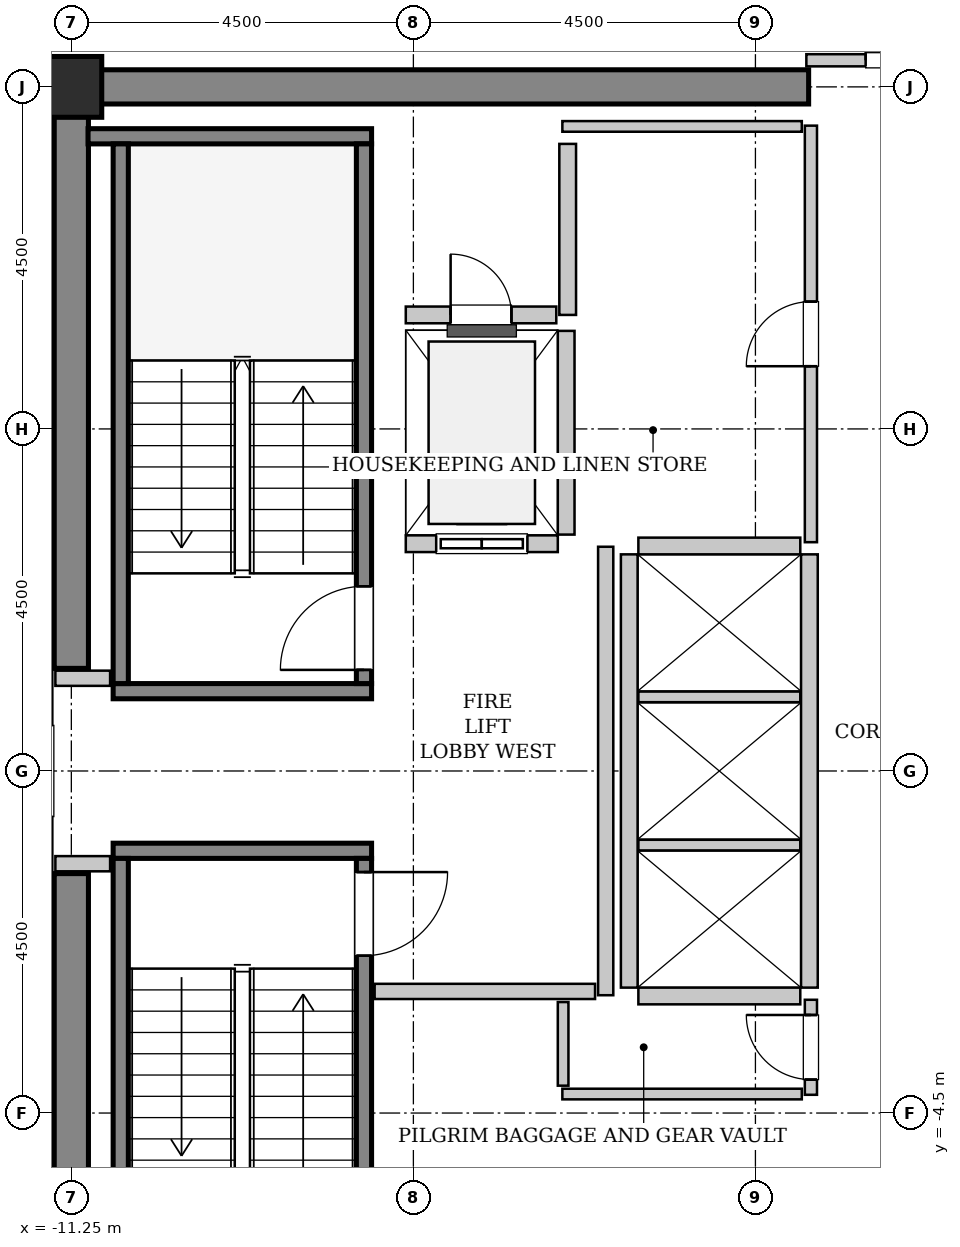
"""IFC4 building model, lengths in metres.
Left out: names, types, materials, properties, quantities, classifications, styles, units other than length and angle.
Written with IfcOpenShell. Run it as: python <this file> out.ifc"""

import sys

from ifc_helpers import new_model, si_unit, direction, frame, frame_2d, origin, origin_2d, place, context, subcontext, project, spatial, rectangle, hollow_rectangle, extrude, source, transform, mapped, element, fill, save


model = new_model("IFC4")
c1 = context("Model", 3, precision=1e-05, world=origin(), true_north=direction((0.0, 1.0)))
c2 = subcontext(c1, "Body", "Model", "MODEL_VIEW")
j1 = project(units=[si_unit("LENGTHUNIT", "METRE"), si_unit("PLANEANGLEUNIT", "RADIAN")], contexts=[c1])
p1 = place(None, origin())
s1 = spatial("IfcSite", under=j1, at=p1, CompositionType="ELEMENT")
p2 = place(p1, origin())
s2 = spatial("IfcBuilding", under=s1, at=p2, CompositionType="ELEMENT")
p3 = place(p2, frame((0.0, 0.0, 214.2)))
s3 = spatial("IfcBuildingStorey", under=s2, at=p3, CompositionType="ELEMENT", Elevation=214.2)
m1 = source(origin(), c2, "Body", "SweptSolid", [
    extrude(rectangle(XDim=9.925, YDim=0.45, at=frame_2d((4.962, 0.0))), origin(), (0.0, 0.0, 1.0), 3.8),
])
p4 = place(p3, frame((-11.475, 9.0, 0.0), z_axis=(0.0, 0.0, 1.0), x_axis=(1.0, 0.0, 0.0)))
e1 = element("IfcWall", 1, at=p4, inside=s3, PredefinedType="SHEAR", context=c2, shape_type="MappedRepresentation", body=[
    mapped(m1, transform((0.0, 0.0, 0.0), x_axis=(1.0, 0.0, 0.0), y_axis=(0.0, 1.0, 0.0), z_axis=(0.0, 0.0, 1.0), scale=1.0)),
])
m2 = source(origin(), c2, "Body", "SweptSolid", [
    extrude(rectangle(XDim=7.425, YDim=0.45, at=frame_2d((3.712, 0.0))), origin(), (0.0, 0.0, 1.0), 3.8),
])
for number, where, z_axis, x_axis in (
    (2, (-11.25, -8.775, 0.0), (0.0, 0.0, 1.0), (0.0, 1.0, 0.0)),
    (3, (-11.25, 1.35, 0.0), (0.0, 0.0, 1.0), (0.0, 1.0, 0.0)),
):
    element("IfcWall", number, at=place(p3, frame(where, z_axis=z_axis, x_axis=x_axis)), inside=s3, PredefinedType="SHEAR", context=c2, shape_type="MappedRepresentation", body=[
        mapped(m2, transform((0.0, 0.0, 0.0), x_axis=(1.0, 0.0, 0.0), y_axis=(0.0, 1.0, 0.0), z_axis=(0.0, 0.0, 1.0), scale=1.0)),
    ])
m3 = source(origin(), c2, "Body", "SweptSolid", [
    extrude(hollow_rectangle(XDim=0.8, YDim=0.8, WallThickness=0.04, InnerFilletRadius=0.04, OuterFilletRadius=0.08, at=origin_2d()), origin(), (0.0, 0.0, 1.0), 3.8),
])
p5 = place(p3, frame((-11.25, 9.0, 0.0), z_axis=(0.0, 0.0, 1.0), x_axis=(1.0, 0.0, 0.0)))
e4 = element("IfcColumn", 4, at=p5, inside=s3, PredefinedType="COLUMN", context=c2, shape_type="MappedRepresentation", body=[
    mapped(m3, transform((0.0, 0.0, 0.0), x_axis=(1.0, 0.0, 0.0), y_axis=(0.0, 1.0, 0.0), z_axis=(0.0, 0.0, 1.0), scale=1.0)),
])
m4 = source(origin(), c2, "Body", "SweptSolid", [
    extrude(rectangle(XDim=3.4, YDim=0.2, at=frame_2d((1.7, 0.0))), origin(), (0.0, 0.0, 1.0), 3.8),
])
p6 = place(p3, frame((-7.3, 1.05, 0.0), z_axis=(0.0, 0.0, 1.0), x_axis=(-1.0, 0.0, 0.0)))
e5 = element("IfcWall", 5, at=p6, inside=s3, PredefinedType="SOLIDWALL", context=c2, shape_type="MappedRepresentation", body=[
    mapped(m4, transform((0.0, 0.0, 0.0), x_axis=(1.0, 0.0, 0.0), y_axis=(0.0, 1.0, 0.0), z_axis=(0.0, 0.0, 1.0), scale=1.0)),
])
m5 = source(origin(), c2, "Body", "SweptSolid", [
    extrude(rectangle(XDim=3.73, YDim=0.2, at=frame_2d((1.865, 0.0))), origin(), (0.0, 0.0, 1.0), 3.8),
])
p7 = place(p3, frame((-7.3, 8.35, 0.0), z_axis=(0.0, 0.0, 1.0), x_axis=(-1.0, 0.0, 0.0)))
e6 = element("IfcWall", 6, at=p7, inside=s3, PredefinedType="SOLIDWALL", context=c2, shape_type="MappedRepresentation", body=[
    mapped(m5, transform((0.0, 0.0, 0.0), x_axis=(1.0, 0.0, 0.0), y_axis=(0.0, 1.0, 0.0), z_axis=(0.0, 0.0, 1.0), scale=1.0)),
])
m6 = source(origin(), c2, "Body", "SweptSolid", [
    extrude(rectangle(XDim=7.1, YDim=0.2, at=frame_2d((3.55, 0.0))), origin(), (0.0, 0.0, 1.0), 3.8),
])
p8 = place(p3, frame((-7.4, 1.15, 0.0), z_axis=(0.0, 0.0, 1.0), x_axis=(0.0, 1.0, 0.0)))
e7 = element("IfcWall", 7, at=p8, inside=s3, PredefinedType="SOLIDWALL", context=c2, shape_type="MappedRepresentation", body=[
    mapped(m6, transform((0.0, 0.0, 0.0), x_axis=(1.0, 0.0, 0.0), y_axis=(0.0, 1.0, 0.0), z_axis=(0.0, 0.0, 1.0), scale=1.0)),
])
p9 = place(p8, frame((0.18, 0.0, 0.0)))
e8 = element("IfcOpeningElement", 8, at=p9, cuts=e7, PredefinedType="OPENING", context=c2, shape_type="SweptSolid", body=[
    extrude(rectangle(XDim=1.1, YDim=2.15, at=frame_2d((0.55, 1.075))), frame((0.0, 0.11, 0.0), z_axis=(0.0, -1.0, 0.0), x_axis=(1.0, 0.0, 0.0)), (0.0, 0.0, 1.0), 0.22),
])
p10 = place(p3, frame((-10.6, 1.15, 0.0), z_axis=(0.0, 0.0, 1.0), x_axis=(0.0, 1.0, 0.0)))
e9 = element("IfcWall", 9, at=p10, inside=s3, PredefinedType="SOLIDWALL", context=c2, shape_type="MappedRepresentation", body=[
    mapped(m6, transform((0.0, 0.0, 0.0), x_axis=(1.0, 0.0, 0.0), y_axis=(0.0, 1.0, 0.0), z_axis=(0.0, 0.0, 1.0), scale=1.0)),
])
p11 = place(p3, frame((-10.7, -1.05, 0.0), z_axis=(0.0, 0.0, 1.0), x_axis=(1.0, 0.0, 0.0)))
e10 = element("IfcWall", 10, at=p11, inside=s3, PredefinedType="SOLIDWALL", context=c2, shape_type="MappedRepresentation", body=[
    mapped(m4, transform((0.0, 0.0, 0.0), x_axis=(1.0, 0.0, 0.0), y_axis=(0.0, 1.0, 0.0), z_axis=(0.0, 0.0, 1.0), scale=1.0)),
])
p12 = place(p3, frame((-10.6, -1.15, 0.0), z_axis=(0.0, 0.0, 1.0), x_axis=(0.0, -1.0, 0.0)))
e11 = element("IfcWall", 11, at=p12, inside=s3, PredefinedType="SOLIDWALL", context=c2, shape_type="MappedRepresentation", body=[
    mapped(m6, transform((0.0, 0.0, 0.0), x_axis=(1.0, 0.0, 0.0), y_axis=(0.0, 1.0, 0.0), z_axis=(0.0, 0.0, 1.0), scale=1.0)),
])
p13 = place(p3, frame((-7.4, -1.15, 0.0), z_axis=(0.0, 0.0, 1.0), x_axis=(0.0, -1.0, 0.0)))
e12 = element("IfcWall", 12, at=p13, inside=s3, PredefinedType="SOLIDWALL", context=c2, shape_type="MappedRepresentation", body=[
    mapped(m6, transform((0.0, 0.0, 0.0), x_axis=(1.0, 0.0, 0.0), y_axis=(0.0, 1.0, 0.0), z_axis=(0.0, 0.0, 1.0), scale=1.0)),
])
p14 = place(p13, frame((0.18, 0.0, 0.0)))
e13 = element("IfcOpeningElement", 13, at=p14, cuts=e12, PredefinedType="OPENING", context=c2, shape_type="SweptSolid", body=[
    extrude(rectangle(XDim=1.1, YDim=2.15, at=frame_2d((0.55, 1.075))), frame((0.0, 0.11, 0.0), z_axis=(0.0, -1.0, 0.0), x_axis=(1.0, 0.0, 0.0)), (0.0, 0.0, 1.0), 0.22),
])
m7 = source(origin(), c2, "Body", "SweptSolid", [
    extrude(rectangle(XDim=2.0, YDim=0.22, at=frame_2d((1.0, 0.0))), origin(), (0.0, 0.0, 1.0), 3.535),
])
p15 = place(p3, frame((-6.85, 2.99, 0.0), z_axis=(0.0, 0.0, 1.0), x_axis=(1.0, 0.0, 0.0)))
e14 = element("IfcWall", 14, at=p15, inside=s3, PredefinedType="SOLIDWALL", context=c2, shape_type="MappedRepresentation", body=[
    mapped(m7, transform((0.0, 0.0, 0.0), x_axis=(1.0, 0.0, 0.0), y_axis=(0.0, 1.0, 0.0), z_axis=(0.0, 0.0, 1.0), scale=1.0)),
])
p16 = place(p15, frame((0.4, 0.0, 0.0)))
e15 = element("IfcOpeningElement", 15, at=p16, cuts=e14, PredefinedType="OPENING", context=c2, shape_type="SweptSolid", body=[
    extrude(rectangle(XDim=1.2, YDim=2.2, at=frame_2d((0.6, 1.1))), frame((0.0, 0.12, 0.0), z_axis=(0.0, -1.0, 0.0), x_axis=(1.0, 0.0, 0.0)), (0.0, 0.0, 1.0), 0.24),
])
m8 = source(origin(), c2, "Body", "SweptSolid", [
    extrude(rectangle(XDim=2.68, YDim=0.22, at=frame_2d((1.34, 0.0))), origin(), (0.0, 0.0, 1.0), 3.535),
])
p17 = place(p3, frame((-4.74, 3.11, 0.0), z_axis=(0.0, 0.0, 1.0), x_axis=(0.0, 1.0, 0.0)))
e16 = element("IfcWall", 16, at=p17, inside=s3, PredefinedType="SOLIDWALL", context=c2, shape_type="MappedRepresentation", body=[
    mapped(m8, transform((0.0, 0.0, 0.0), x_axis=(1.0, 0.0, 0.0), y_axis=(0.0, 1.0, 0.0), z_axis=(0.0, 0.0, 1.0), scale=1.0)),
])
m9 = source(origin(), c2, "Body", "SweptSolid", [
    extrude(rectangle(XDim=5.7, YDim=0.22, at=frame_2d((2.85, 0.0))), origin(), (0.0, 0.0, 1.0), 3.535),
])
for number, where, z_axis, x_axis in (
    (17, (-1.54, -2.85, 0.0), (0.0, 0.0, 1.0), (0.0, 1.0, 0.0)),
    (18, (-3.91, 2.85, 0.0), (0.0, 0.0, 1.0), (0.0, -1.0, 0.0)),
):
    element("IfcWall", number, at=place(p3, frame(where, z_axis=z_axis, x_axis=x_axis)), inside=s3, PredefinedType="SOLIDWALL", context=c2, shape_type="MappedRepresentation", body=[
        mapped(m9, transform((0.0, 0.0, 0.0), x_axis=(1.0, 0.0, 0.0), y_axis=(0.0, 1.0, 0.0), z_axis=(0.0, 0.0, 1.0), scale=1.0)),
    ])
m10 = source(origin(), c2, "Body", "SweptSolid", [
    extrude(rectangle(XDim=2.13, YDim=0.22, at=frame_2d((1.065, 0.0))), origin(), (0.0, 0.0, 1.0), 3.535),
])
p18 = place(p3, frame((-3.79, -2.96, 0.0), z_axis=(0.0, 0.0, 1.0), x_axis=(1.0, 0.0, 0.0)))
e19 = element("IfcWall", 19, at=p18, inside=s3, PredefinedType="SOLIDWALL", context=c2, shape_type="MappedRepresentation", body=[
    mapped(m10, transform((0.0, 0.0, 0.0), x_axis=(1.0, 0.0, 0.0), y_axis=(0.0, 1.0, 0.0), z_axis=(0.0, 0.0, 1.0), scale=1.0)),
])
m11 = source(origin(), c2, "Body", "SweptSolid", [
    extrude(rectangle(XDim=2.13, YDim=0.14, at=frame_2d((1.065, 0.0))), origin(), (0.0, 0.0, 1.0), 3.535),
])
for number, where, z_axis, x_axis in (
    (20, (-3.79, -0.975, 0.0), (0.0, 0.0, 1.0), (1.0, 0.0, 0.0)),
    (21, (-3.79, 0.975, 0.0), (0.0, 0.0, 1.0), (1.0, 0.0, 0.0)),
):
    element("IfcWall", number, at=place(p3, frame(where, z_axis=z_axis, x_axis=x_axis)), inside=s3, PredefinedType="PARTITIONING", context=c2, shape_type="MappedRepresentation", body=[
        mapped(m11, transform((0.0, 0.0, 0.0), x_axis=(1.0, 0.0, 0.0), y_axis=(0.0, 1.0, 0.0), z_axis=(0.0, 0.0, 1.0), scale=1.0)),
    ])
p19 = place(p3, frame((-1.66, 2.96, 0.0), z_axis=(0.0, 0.0, 1.0), x_axis=(-1.0, 0.0, 0.0)))
e22 = element("IfcWall", 22, at=p19, inside=s3, PredefinedType="SOLIDWALL", context=c2, shape_type="MappedRepresentation", body=[
    mapped(m10, transform((0.0, 0.0, 0.0), x_axis=(1.0, 0.0, 0.0), y_axis=(0.0, 1.0, 0.0), z_axis=(0.0, 0.0, 1.0), scale=1.0)),
])
m12 = source(origin(), c2, "Body", "SweptSolid", [
    extrude(rectangle(XDim=2.25, YDim=0.22, at=frame_2d((1.125, 0.0))), origin(), (0.0, 0.0, 1.0), 3.535),
])
p20 = place(p3, frame((-4.72, 6.0, 0.0), z_axis=(0.0, 0.0, 1.0), x_axis=(0.0, 1.0, 0.0)))
e23 = element("IfcWall", 23, at=p20, inside=s3, PredefinedType="SOLIDWALL", context=c2, shape_type="MappedRepresentation", body=[
    mapped(m12, transform((0.0, 0.0, 0.0), x_axis=(1.0, 0.0, 0.0), y_axis=(0.0, 1.0, 0.0), z_axis=(0.0, 0.0, 1.0), scale=1.0)),
])
m13 = source(origin(), c2, "Body", "SweptSolid", [
    extrude(rectangle(XDim=1.98, YDim=0.22, at=frame_2d((0.99, 0.0))), origin(), (0.0, 0.0, 1.0), 3.535),
])
p21 = place(p3, frame((-6.85, 6.0, 0.0), z_axis=(0.0, 0.0, 1.0), x_axis=(1.0, 0.0, 0.0)))
e24 = element("IfcWall", 24, at=p21, inside=s3, PredefinedType="SOLIDWALL", context=c2, shape_type="MappedRepresentation", body=[
    mapped(m13, transform((0.0, 0.0, 0.0), x_axis=(1.0, 0.0, 0.0), y_axis=(0.0, 1.0, 0.0), z_axis=(0.0, 0.0, 1.0), scale=1.0)),
])
p22 = place(p21, frame((0.59, 0.0, 0.0)))
e25 = element("IfcOpeningElement", 25, at=p22, cuts=e24, PredefinedType="OPENING", context=c2, shape_type="SweptSolid", body=[
    extrude(rectangle(XDim=0.8, YDim=2.0, at=frame_2d((0.4, 1.0))), frame((0.0, 0.12, 0.0), z_axis=(0.0, -1.0, 0.0), x_axis=(1.0, 0.0, 0.0)), (0.0, 0.0, 1.0), 0.24),
])
m14 = source(origin(), c2, "Body", "SweptSolid", [
    extrude(rectangle(XDim=5.9, YDim=0.2, at=frame_2d((2.95, 0.0))), origin(), (0.0, 0.0, 1.0), 3.535),
])
p23 = place(p3, frame((-4.22, -2.95, 0.0), z_axis=(0.0, 0.0, 1.0), x_axis=(0.0, 1.0, 0.0)))
e26 = element("IfcWall", 26, at=p23, inside=s3, PredefinedType="PARTITIONING", context=c2, shape_type="MappedRepresentation", body=[
    mapped(m14, transform((0.0, 0.0, 0.0), x_axis=(1.0, 0.0, 0.0), y_axis=(0.0, 1.0, 0.0), z_axis=(0.0, 0.0, 1.0), scale=1.0)),
])
m15 = source(origin(), c2, "Body", "SweptSolid", [
    extrude(rectangle(XDim=2.9, YDim=0.2, at=frame_2d((1.45, 0.0))), origin(), (0.0, 0.0, 1.0), 3.535),
])
p24 = place(p3, frame((-7.26, -2.9, 0.0), z_axis=(0.0, 0.0, 1.0), x_axis=(1.0, 0.0, 0.0)))
e27 = element("IfcWall", 27, at=p24, inside=s3, PredefinedType="PARTITIONING", context=c2, shape_type="MappedRepresentation", body=[
    mapped(m15, transform((0.0, 0.0, 0.0), x_axis=(1.0, 0.0, 0.0), y_axis=(0.0, 1.0, 0.0), z_axis=(0.0, 0.0, 1.0), scale=1.0)),
])
m16 = source(origin(), c2, "Body", "SweptSolid", [
    extrude(rectangle(XDim=0.72, YDim=0.2, at=frame_2d((0.36, 0.0))), origin(), (0.0, 0.0, 1.0), 3.535),
])
for number, where, z_axis, x_axis in (
    (28, (-11.46, 1.22, 0.0), (0.0, 0.0, 1.0), (1.0, 0.0, 0.0)),
    (29, (-11.46, -1.22, 0.0), (0.0, 0.0, 1.0), (1.0, 0.0, 0.0)),
):
    element("IfcWall", number, at=place(p3, frame(where, z_axis=z_axis, x_axis=x_axis)), inside=s3, PredefinedType="PARTITIONING", context=c2, shape_type="MappedRepresentation", body=[
        mapped(m16, transform((0.0, 0.0, 0.0), x_axis=(1.0, 0.0, 0.0), y_axis=(0.0, 1.0, 0.0), z_axis=(0.0, 0.0, 1.0), scale=1.0)),
    ])
m17 = source(origin(), c2, "Body", "SweptSolid", [
    extrude(rectangle(XDim=3.16, YDim=0.16, at=frame_2d((1.58, 0.0))), origin(), (0.0, 0.0, 1.0), 2.625),
])
p25 = place(p3, frame((-1.58, 9.35, 0.0), z_axis=(0.0, 0.0, 1.0), x_axis=(1.0, 0.0, 0.0)))
e30 = element("IfcWall", 30, at=p25, inside=s3, PredefinedType="PARTITIONING", context=c2, shape_type="MappedRepresentation", body=[
    mapped(m17, transform((0.0, 0.0, 0.0), x_axis=(1.0, 0.0, 0.0), y_axis=(0.0, 1.0, 0.0), z_axis=(0.0, 0.0, 1.0), scale=1.0)),
])
p26 = place(p25, frame((0.78, 0.0, 0.0)))
e31 = element("IfcOpeningElement", 31, at=p26, cuts=e30, PredefinedType="OPENING", context=c2, shape_type="SweptSolid", body=[
    extrude(rectangle(XDim=1.6, YDim=2.3, at=frame_2d((0.8, 1.15))), frame((0.0, 0.09, 0.0), z_axis=(0.0, -1.0, 0.0), x_axis=(1.0, 0.0, 0.0)), (0.0, 0.0, 1.0), 0.18),
])
m18 = source(origin(), c2, "Body", "SweptSolid", [
    extrude(rectangle(XDim=5.48, YDim=0.16, at=frame_2d((2.74, 0.0))), origin(), (0.0, 0.0, 1.0), 3.535),
])
p27 = place(p3, frame((-1.52, 3.01, 0.0), z_axis=(0.0, 0.0, 1.0), x_axis=(0.0, 1.0, 0.0)))
e32 = element("IfcWall", 32, at=p27, inside=s3, PredefinedType="PARTITIONING", context=c2, shape_type="MappedRepresentation", body=[
    mapped(m18, transform((0.0, 0.0, 0.0), x_axis=(1.0, 0.0, 0.0), y_axis=(0.0, 1.0, 0.0), z_axis=(0.0, 0.0, 1.0), scale=1.0)),
])
p28 = place(p27, frame((2.315, 0.0, 0.0)))
e33 = element("IfcOpeningElement", 33, at=p28, cuts=e32, PredefinedType="OPENING", context=c2, shape_type="SweptSolid", body=[
    extrude(rectangle(XDim=0.85, YDim=2.1, at=frame_2d((0.425, 1.05))), frame((0.0, 0.09, 0.0), z_axis=(0.0, -1.0, 0.0), x_axis=(1.0, 0.0, 0.0)), (0.0, 0.0, 1.0), 0.18),
])
m19 = source(origin(), c2, "Body", "SweptSolid", [
    extrude(rectangle(XDim=3.15, YDim=0.14, at=frame_2d((1.575, 0.0))), origin(), (0.0, 0.0, 1.0), 3.535),
])
p29 = place(p3, frame((-4.79, 8.48, 0.0), z_axis=(0.0, 0.0, 1.0), x_axis=(1.0, 0.0, 0.0)))
e34 = element("IfcWall", 34, at=p29, inside=s3, PredefinedType="PARTITIONING", context=c2, shape_type="MappedRepresentation", body=[
    mapped(m19, transform((0.0, 0.0, 0.0), x_axis=(1.0, 0.0, 0.0), y_axis=(0.0, 1.0, 0.0), z_axis=(0.0, 0.0, 1.0), scale=1.0)),
])
m20 = source(origin(), c2, "Body", "SweptSolid", [
    extrude(rectangle(XDim=1.25, YDim=0.16, at=frame_2d((0.625, 0.0))), origin(), (0.0, 0.0, 1.0), 3.535),
])
p30 = place(p3, frame((-1.52, -4.26, 0.0), z_axis=(0.0, 0.0, 1.0), x_axis=(0.0, 1.0, 0.0)))
e35 = element("IfcWall", 35, at=p30, inside=s3, PredefinedType="PARTITIONING", context=c2, shape_type="MappedRepresentation", body=[
    mapped(m20, transform((0.0, 0.0, 0.0), x_axis=(1.0, 0.0, 0.0), y_axis=(0.0, 1.0, 0.0), z_axis=(0.0, 0.0, 1.0), scale=1.0)),
])
p31 = place(p30, frame((0.2, 0.0, 0.0)))
e36 = element("IfcOpeningElement", 36, at=p31, cuts=e35, PredefinedType="OPENING", context=c2, shape_type="SweptSolid", body=[
    extrude(rectangle(XDim=0.85, YDim=2.1, at=frame_2d((0.425, 1.05))), frame((0.0, 0.09, 0.0), z_axis=(0.0, -1.0, 0.0), x_axis=(1.0, 0.0, 0.0)), (0.0, 0.0, 1.0), 0.18),
])
p32 = place(p3, frame((-4.79, -4.25, 0.0), z_axis=(0.0, 0.0, 1.0), x_axis=(1.0, 0.0, 0.0)))
e37 = element("IfcWall", 37, at=p32, inside=s3, PredefinedType="PARTITIONING", context=c2, shape_type="MappedRepresentation", body=[
    mapped(m19, transform((0.0, 0.0, 0.0), x_axis=(1.0, 0.0, 0.0), y_axis=(0.0, 1.0, 0.0), z_axis=(0.0, 0.0, 1.0), scale=1.0)),
])
m21 = source(origin(), c2, "Body", "SweptSolid", [
    extrude(rectangle(XDim=1.1, YDim=0.14, at=frame_2d((0.55, 0.0))), origin(), (0.0, 0.0, 1.0), 3.535),
])
p33 = place(p3, frame((-4.78, -4.14, 0.0), z_axis=(0.0, 0.0, 1.0), x_axis=(0.0, 1.0, 0.0)))
e38 = element("IfcWall", 38, at=p33, inside=s3, PredefinedType="PARTITIONING", context=c2, shape_type="MappedRepresentation", body=[
    mapped(m21, transform((0.0, 0.0, 0.0), x_axis=(1.0, 0.0, 0.0), y_axis=(0.0, 1.0, 0.0), z_axis=(0.0, 0.0, 1.0), scale=1.0)),
])
m22 = source(origin(), c2, "Body", "SweptSolid", [
    extrude(rectangle(XDim=1.1, YDim=2.15, at=frame_2d((0.55, 1.075))), frame((0.0, 0.025, 0.0), z_axis=(0.0, -1.0, 0.0), x_axis=(1.0, 0.0, 0.0)), (0.0, 0.0, 1.0), 0.05),
])
p34 = place(p9, origin())
e39 = element("IfcDoor", 39, at=p34, inside=s3, OperationType="SINGLE_SWING_LEFT", PredefinedType="DOOR", context=c2, shape_type="MappedRepresentation", body=[
    mapped(m22, transform((0.0, 0.0, 0.0), x_axis=(1.0, 0.0, 0.0), y_axis=(0.0, 1.0, 0.0), z_axis=(0.0, 0.0, 1.0), scale=1.0)),
])
fill(e8, e39)
p35 = place(p14, origin())
e40 = element("IfcDoor", 40, at=p35, inside=s3, OperationType="SINGLE_SWING_LEFT", PredefinedType="DOOR", context=c2, shape_type="MappedRepresentation", body=[
    mapped(m22, transform((0.0, 0.0, 0.0), x_axis=(1.0, 0.0, 0.0), y_axis=(0.0, 1.0, 0.0), z_axis=(0.0, 0.0, 1.0), scale=1.0)),
])
fill(e13, e40)
m23 = source(origin(), c2, "Body", "SweptSolid", [
    extrude(rectangle(XDim=1.2, YDim=2.2, at=frame_2d((0.6, 1.1))), frame((0.0, 0.025, 0.0), z_axis=(0.0, -1.0, 0.0), x_axis=(1.0, 0.0, 0.0)), (0.0, 0.0, 1.0), 0.05),
])
p36 = place(p16, origin())
e41 = element("IfcDoor", 41, at=p36, inside=s3, OperationType="SLIDING_TO_LEFT", PredefinedType="DOOR", context=c2, shape_type="MappedRepresentation", body=[
    mapped(m23, transform((0.0, 0.0, 0.0), x_axis=(1.0, 0.0, 0.0), y_axis=(0.0, 1.0, 0.0), z_axis=(0.0, 0.0, 1.0), scale=1.0)),
])
fill(e15, e41)
m24 = source(origin(), c2, "Body", "SweptSolid", [
    extrude(rectangle(XDim=0.8, YDim=2.0, at=frame_2d((0.4, 1.0))), frame((0.0, 0.025, 0.0), z_axis=(0.0, -1.0, 0.0), x_axis=(1.0, 0.0, 0.0)), (0.0, 0.0, 1.0), 0.05),
])
p37 = place(p22, origin())
e42 = element("IfcDoor", 42, at=p37, inside=s3, OperationType="SINGLE_SWING_LEFT", PredefinedType="TRAPDOOR", context=c2, shape_type="MappedRepresentation", body=[
    mapped(m24, transform((0.0, 0.0, 0.0), x_axis=(1.0, 0.0, 0.0), y_axis=(0.0, 1.0, 0.0), z_axis=(0.0, 0.0, 1.0), scale=1.0)),
])
fill(e25, e42)
m25 = source(origin(), c2, "Body", "SweptSolid", [
    extrude(rectangle(XDim=1.6, YDim=2.3, at=frame_2d((0.8, 1.15))), frame((0.0, 0.025, 0.0), z_axis=(0.0, -1.0, 0.0), x_axis=(1.0, 0.0, 0.0)), (0.0, 0.0, 1.0), 0.05),
])
p38 = place(p26, origin())
e43 = element("IfcDoor", 43, at=p38, inside=s3, OperationType="DOUBLE_DOOR_SINGLE_SWING", PredefinedType="DOOR", context=c2, shape_type="MappedRepresentation", body=[
    mapped(m25, transform((0.0, 0.0, 0.0), x_axis=(1.0, 0.0, 0.0), y_axis=(0.0, 1.0, 0.0), z_axis=(0.0, 0.0, 1.0), scale=1.0)),
])
fill(e31, e43)
m26 = source(origin(), c2, "Body", "SweptSolid", [
    extrude(rectangle(XDim=0.85, YDim=2.1, at=frame_2d((0.425, 1.05))), frame((0.0, 0.025, 0.0), z_axis=(0.0, -1.0, 0.0), x_axis=(1.0, 0.0, 0.0)), (0.0, 0.0, 1.0), 0.05),
])
p39 = place(p28, origin())
e44 = element("IfcDoor", 44, at=p39, inside=s3, OperationType="SINGLE_SWING_LEFT", PredefinedType="DOOR", context=c2, shape_type="MappedRepresentation", body=[
    mapped(m26, transform((0.0, 0.0, 0.0), x_axis=(1.0, 0.0, 0.0), y_axis=(0.0, 1.0, 0.0), z_axis=(0.0, 0.0, 1.0), scale=1.0)),
])
fill(e33, e44)
p40 = place(p31, origin())
e45 = element("IfcDoor", 45, at=p40, inside=s3, OperationType="SINGLE_SWING_RIGHT", PredefinedType="DOOR", context=c2, shape_type="MappedRepresentation", body=[
    mapped(m26, transform((0.0, 0.0, 0.0), x_axis=(1.0, 0.0, 0.0), y_axis=(0.0, 1.0, 0.0), z_axis=(0.0, 0.0, 1.0), scale=1.0)),
])
fill(e36, e45)
save(model, sys.argv[1])
